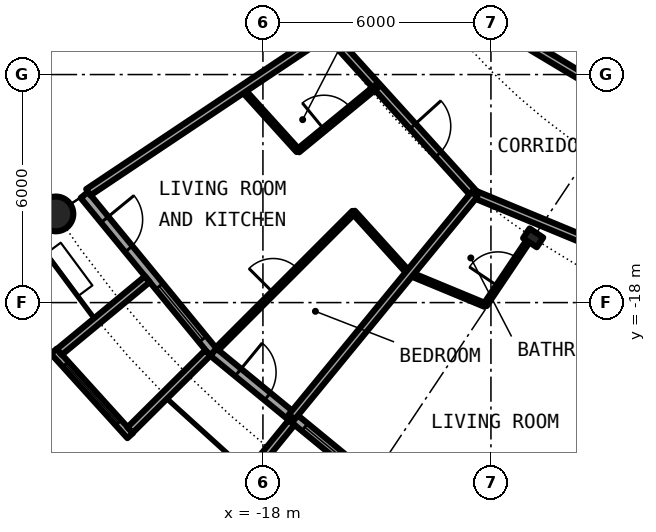
"""IFC4 building model, lengths in metres.
Left out: names, types, materials, properties, quantities, classifications, styles, units other than length and angle.
Written with IfcOpenShell. Run it as: python <this file> out.ifc"""

import sys

from ifc_helpers import new_model, si_unit, direction, frame, frame_2d, origin, origin_2d, place, context, subcontext, project, spatial, rectangle, circle, hollow_circle, i_section, extrude, element, fill, save


model = new_model("IFC4")
c1 = context("Model", 3, precision=1e-05, world=origin(), true_north=direction((0.0, 1.0)))
c2 = subcontext(c1, "Body", "Model", "MODEL_VIEW")
j1 = project(units=[si_unit("LENGTHUNIT", "METRE"), si_unit("PLANEANGLEUNIT", "RADIAN")], contexts=[c1])
p1 = place(None, origin())
s1 = spatial("IfcSite", under=j1, at=p1, CompositionType="ELEMENT")
p2 = place(p1, origin())
s2 = spatial("IfcBuilding", under=s1, at=p2, CompositionType="ELEMENT")
p3 = place(p2, frame((0.0, 0.0, 120.8)))
s3 = spatial("IfcBuildingStorey", under=s2, at=p3, CompositionType="ELEMENT", Elevation=120.8)
p4 = place(p3, frame((-23.448, -15.667, 0.0), z_axis=(0.0, 0.0, 1.0), x_axis=(1.0, 0.0, 0.0)))
e1 = element("IfcColumn", 1, at=p4, inside=s3, PredefinedType="COLUMN", context=c2, shape_type="SweptSolid", body=[
    extrude(hollow_circle(Radius=0.457, WallThickness=0.04, at=origin_2d()), origin(), (0.0, 0.0, 1.0), 3.05),
])
p5 = place(p3, frame((-10.889, -16.297, 0.0), z_axis=(0.0, 0.0, 1.0), x_axis=(-0.55557023302, -0.831469612303, 0.0)))
e2 = element("IfcColumn", 2, at=p5, inside=s3, PredefinedType="COLUMN", context=c2, shape_type="SweptSolid", body=[
    extrude(i_section(OverallWidth=0.307, OverallDepth=0.432, WebThickness=0.021, FlangeThickness=0.04, FilletRadius=0.027, at=origin_2d()), origin(), (0.0, 0.0, 1.0), 3.05),
])
p6 = place(p3, frame((-22.699, -15.167, 0.0), z_axis=(0.0, 0.0, 1.0), x_axis=(0.634382322723, -0.773019449054, 0.0)))
e3 = element("IfcWall", 3, at=p6, inside=s3, PredefinedType="SOLIDWALL", context=c2, shape_type="SweptSolid", body=[
    extrude(rectangle(XDim=5.352, YDim=0.25, at=frame_2d((2.676, 0.0))), origin(), (0.0, 0.0, 1.0), 2.7),
])
p7 = place(p6, frame((0.841, 0.0, 0.0)))
e4 = element("IfcOpeningElement", 4, at=p7, cuts=e3, PredefinedType="OPENING", context=c2, shape_type="SweptSolid", body=[
    extrude(rectangle(XDim=1.0, YDim=2.2, at=frame_2d((0.5, 1.1))), frame((0.0, 0.135, 0.0), z_axis=(0.0, -1.0, 0.0), x_axis=(1.0, 0.0, 0.0)), (0.0, 0.0, 1.0), 0.27),
])
p8 = place(p6, frame((3.111, 0.0, 0.3)))
e5 = element("IfcOpeningElement", 5, at=p8, cuts=e3, PredefinedType="OPENING", context=c2, shape_type="SweptSolid", body=[
    extrude(rectangle(XDim=1.8, YDim=2.1, at=frame_2d((0.9, 1.05))), frame((0.0, 0.135, 0.0), z_axis=(0.0, -1.0, 0.0), x_axis=(1.0, 0.0, 0.0)), (0.0, 0.0, 1.0), 0.27),
])
p9 = place(p3, frame((-23.503, -19.282, -0.03), z_axis=(0.0, 0.0, 1.0), x_axis=(0.671506829416, -0.740998365753, 0.0)))
e6 = element("IfcWall", 6, at=p9, inside=s3, PredefinedType="SOLIDWALL", context=c2, shape_type="SweptSolid", body=[
    extrude(rectangle(XDim=2.993, YDim=0.2, at=frame_2d((1.497, 0.0))), origin(), (0.0, 0.0, 1.0), 2.73),
])
p10 = place(p9, frame((0.457, 0.0, 0.33)))
e7 = element("IfcOpeningElement", 7, at=p10, cuts=e6, PredefinedType="OPENING", context=c2, shape_type="SweptSolid", body=[
    extrude(circle(Radius=1.04, at=frame_2d((1.04, 1.04))), frame((0.0, 0.11, 0.0), z_axis=(0.0, -1.0, 0.0), x_axis=(1.0, 0.0, 0.0)), (0.0, 0.0, 1.0), 0.22),
])
p11 = place(p3, frame((-21.041, -17.384, -0.03), z_axis=(0.0, 0.0, 1.0), x_axis=(-0.770784861449, -0.63709551667, 0.0)))
e8 = element("IfcWall", 8, at=p11, inside=s3, PredefinedType="SOLIDWALL", context=c2, shape_type="SweptSolid", body=[
    extrude(rectangle(XDim=3.006, YDim=0.2, at=frame_2d((1.503, 0.0))), origin(), (0.0, 0.0, 1.0), 2.73),
])
p12 = place(p3, frame((-19.45, -19.323, -0.03), z_axis=(0.0, 0.0, 1.0), x_axis=(-0.709727076896, -0.704476739375, 0.0)))
e9 = element("IfcWall", 9, at=p12, inside=s3, PredefinedType="SOLIDWALL", context=c2, shape_type="SweptSolid", body=[
    extrude(rectangle(XDim=2.883, YDim=0.2, at=frame_2d((1.441, 0.0))), origin(), (0.0, 0.0, 1.0), 2.73),
])
p13 = place(p3, frame((-19.304, -19.304, 0.0), z_axis=(0.0, 0.0, 1.0), x_axis=(0.773019449054, -0.634382322723, 0.0)))
e10 = element("IfcWall", 10, at=p13, inside=s3, PredefinedType="SOLIDWALL", context=c2, shape_type="SweptSolid", body=[
    extrude(rectangle(XDim=5.352, YDim=0.25, at=frame_2d((2.676, 0.0))), origin(), (0.0, 0.0, 1.0), 2.7),
])
p14 = place(p13, frame((0.841, 0.0, 0.0)))
e11 = element("IfcOpeningElement", 11, at=p14, cuts=e10, PredefinedType="OPENING", context=c2, shape_type="SweptSolid", body=[
    extrude(rectangle(XDim=1.0, YDim=2.2, at=frame_2d((0.5, 1.1))), frame((0.0, 0.135, 0.0), z_axis=(0.0, -1.0, 0.0), x_axis=(1.0, 0.0, 0.0)), (0.0, 0.0, 1.0), 0.27),
])
p15 = place(p13, frame((3.111, 0.0, 0.3)))
e12 = element("IfcOpeningElement", 12, at=p15, cuts=e10, PredefinedType="OPENING", context=c2, shape_type="SweptSolid", body=[
    extrude(rectangle(XDim=1.8, YDim=2.1, at=frame_2d((0.9, 1.05))), frame((0.0, 0.135, 0.0), z_axis=(0.0, -1.0, 0.0), x_axis=(1.0, 0.0, 0.0)), (0.0, 0.0, 1.0), 0.27),
])
p16 = place(p3, frame((-17.246, -21.155, -0.03), z_axis=(0.0, 0.0, 1.0), x_axis=(-0.631741648902, -0.775179004516, 0.0)))
e13 = element("IfcWall", 13, at=p16, inside=s3, PredefinedType="SOLIDWALL", context=c2, shape_type="SweptSolid", body=[
    extrude(rectangle(XDim=3.006, YDim=0.2, at=frame_2d((1.503, 0.0))), origin(), (0.0, 0.0, 1.0), 2.73),
])
p17 = place(p3, frame((-18.542, -12.389, 0.0), z_axis=(0.0, 0.0, 1.0), x_axis=(0.671396556615, -0.741098282123, 0.0)))
e14 = element("IfcWall", 14, at=p17, inside=s3, PredefinedType="PARTITIONING", context=c2, shape_type="SweptSolid", body=[
    extrude(rectangle(XDim=2.182, YDim=0.1, at=frame_2d((1.091, 0.0))), origin(), (0.0, 0.0, 1.0), 2.7),
])
p18 = place(p3, frame((-15.617, -15.617, 0.0), z_axis=(0.0, 0.0, 1.0), x_axis=(0.671144831591, -0.741326254107, 0.0)))
e15 = element("IfcWall", 15, at=p18, inside=s3, PredefinedType="PARTITIONING", context=c2, shape_type="SweptSolid", body=[
    extrude(rectangle(XDim=2.181, YDim=0.1, at=frame_2d((1.091, 0.0))), origin(), (0.0, 0.0, 1.0), 2.7),
])
p19 = place(p3, frame((-14.147, -17.238, 0.0), z_axis=(0.0, 0.0, 1.0), x_axis=(0.923874819588, -0.382694810171, 0.0)))
e16 = element("IfcWall", 16, at=p19, inside=s3, PredefinedType="PARTITIONING", context=c2, shape_type="SweptSolid", body=[
    extrude(rectangle(XDim=2.158, YDim=0.1, at=frame_2d((1.079, 0.0))), origin(), (0.0, 0.0, 1.0), 2.7),
])
p20 = place(p3, frame((-16.192, -11.004, 0.0), z_axis=(0.0, 0.0, 1.0), x_axis=(0.671481997275, -0.741020868354, 0.0)))
e17 = element("IfcWall", 17, at=p20, inside=s3, PredefinedType="PARTITIONING", context=c2, shape_type="SweptSolid", body=[
    extrude(rectangle(XDim=5.596, YDim=0.2, at=frame_2d((2.798, 0.0))), origin(), (0.0, 0.0, 1.0), 2.39),
])
p21 = place(p20, frame((3.179, 0.0, 0.0)))
e18 = element("IfcOpeningElement", 18, at=p21, cuts=e17, PredefinedType="OPENING", context=c2, shape_type="SweptSolid", body=[
    extrude(rectangle(XDim=1.0, YDim=2.3, at=frame_2d((0.5, 1.15))), frame((0.0, 0.11, 0.0), z_axis=(0.0, -1.0, 0.0), x_axis=(1.0, 0.0, 0.0)), (0.0, 0.0, 1.0), 0.22),
])
p22 = place(p3, frame((-12.434, -15.151, 0.0), z_axis=(0.0, 0.0, 1.0), x_axis=(0.923888467236, -0.382661861319, 0.0)))
e19 = element("IfcWall", 19, at=p22, inside=s3, PredefinedType="PARTITIONING", context=c2, shape_type="SweptSolid", body=[
    extrude(rectangle(XDim=11.381, YDim=0.2, at=frame_2d((5.691, 0.0))), origin(), (0.0, 0.0, 1.0), 2.7),
])
p23 = place(p22, frame((3.292, 0.0, 0.0)))
e20 = element("IfcOpeningElement", 20, at=p23, cuts=e19, PredefinedType="OPENING", context=c2, shape_type="SweptSolid", body=[
    extrude(rectangle(XDim=1.0, YDim=2.3, at=frame_2d((0.5, 1.15))), frame((0.0, 0.11, 0.0), z_axis=(0.0, -1.0, 0.0), x_axis=(1.0, 0.0, 0.0)), (0.0, 0.0, 1.0), 0.22),
])
p24 = place(p3, frame((-14.051, -9.391, 0.0), z_axis=(0.0, 0.0, 1.0), x_axis=(0.857768591583, -0.514036033069, 0.0)))
e21 = element("IfcWall", 21, at=p24, inside=s3, PredefinedType="PARTITIONING", context=c2, shape_type="SweptSolid", body=[
    extrude(rectangle(XDim=14.45, YDim=0.2, at=frame_2d((7.225, 0.0))), origin(), (0.0, 0.0, 1.0), 2.7),
])
p25 = place(p24, frame((9.133, 0.0, 0.0)))
e22 = element("IfcOpeningElement", 22, at=p25, cuts=e21, PredefinedType="OPENING", context=c2, shape_type="SweptSolid", body=[
    extrude(rectangle(XDim=1.0, YDim=2.3, at=frame_2d((0.5, 1.15))), frame((0.0, 0.11, 0.0), z_axis=(0.0, -1.0, 0.0), x_axis=(1.0, 0.0, 0.0)), (0.0, 0.0, 1.0), 0.22),
])
p26 = place(p3, frame((-22.595, -15.097, 0.0), z_axis=(0.0, 0.0, 1.0), x_axis=(0.831467903109, 0.555572791, 0.0)))
e23 = element("IfcWall", 23, at=p26, inside=s3, PredefinedType="PARTITIONING", context=c2, shape_type="SweptSolid", body=[
    extrude(rectangle(XDim=7.358, YDim=0.2, at=frame_2d((3.679, 0.0))), origin(), (0.0, 0.0, 1.0), 2.7),
])
p27 = place(p3, frame((-19.21, -19.222, 0.0), z_axis=(0.0, 0.0, 1.0), x_axis=(0.706914880313, 0.707298629994, 0.0)))
e24 = element("IfcWall", 24, at=p27, inside=s3, PredefinedType="PARTITIONING", context=c2, shape_type="SweptSolid", body=[
    extrude(rectangle(XDim=5.09, YDim=0.1, at=frame_2d((2.545, 0.0))), origin(), (0.0, 0.0, 1.0), 2.7),
])
p28 = place(p27, frame((2.095, 0.0, 0.0)))
e25 = element("IfcOpeningElement", 25, at=p28, cuts=e24, PredefinedType="OPENING", context=c2, shape_type="SweptSolid", body=[
    extrude(rectangle(XDim=0.9, YDim=2.3, at=frame_2d((0.45, 1.15))), frame((0.0, 0.06, 0.0), z_axis=(0.0, -1.0, 0.0), x_axis=(1.0, 0.0, 0.0)), (0.0, 0.0, 1.0), 0.12),
])
p29 = place(p3, frame((-17.24, -21.007, 0.0), z_axis=(0.0, 0.0, 1.0), x_axis=(0.634381303318, 0.773020285633, 0.0)))
e26 = element("IfcWall", 26, at=p29, inside=s3, PredefinedType="PARTITIONING", context=c2, shape_type="SweptSolid", body=[
    extrude(rectangle(XDim=7.576, YDim=0.2, at=frame_2d((3.788, 0.0))), origin(), (0.0, 0.0, 1.0), 2.7),
])
p30 = place(p3, frame((-17.077, -14.006, 0.0), z_axis=(0.0, 0.0, 1.0), x_axis=(0.77319617123, 0.634166918717, 0.0)))
e27 = element("IfcWall", 27, at=p30, inside=s3, PredefinedType="PARTITIONING", context=c2, shape_type="SweptSolid", body=[
    extrude(rectangle(XDim=2.675, YDim=0.1, at=frame_2d((1.337, 0.0))), origin(), (0.0, 0.0, 1.0), 2.7),
])
p31 = place(p30, frame((0.887, 0.0, 0.0)))
e28 = element("IfcOpeningElement", 28, at=p31, cuts=e27, PredefinedType="OPENING", context=c2, shape_type="SweptSolid", body=[
    extrude(rectangle(XDim=0.9, YDim=2.3, at=frame_2d((0.45, 1.15))), frame((0.0, 0.06, 0.0), z_axis=(0.0, -1.0, 0.0), x_axis=(1.0, 0.0, 0.0)), (0.0, 0.0, 1.0), 0.12),
])
p32 = place(p3, frame((-12.153, -18.064, 0.0), z_axis=(0.0, 0.0, 1.0), x_axis=(0.557893831879, 0.829912328112, 0.0)))
e29 = element("IfcWall", 29, at=p32, inside=s3, PredefinedType="PARTITIONING", context=c2, shape_type="SweptSolid", body=[
    extrude(rectangle(XDim=1.956, YDim=0.1, at=frame_2d((0.978, 0.0))), origin(), (0.0, 0.0, 1.0), 2.7),
])
p33 = place(p32, frame((0.6, 0.0, 0.0)))
e30 = element("IfcOpeningElement", 30, at=p33, cuts=e29, PredefinedType="OPENING", context=c2, shape_type="SweptSolid", body=[
    extrude(rectangle(XDim=0.9, YDim=2.3, at=frame_2d((0.45, 1.15))), frame((0.0, 0.06, 0.0), z_axis=(0.0, -1.0, 0.0), x_axis=(1.0, 0.0, 0.0)), (0.0, 0.0, 1.0), 0.12),
])
p34 = place(p3, frame((-10.399, -25.106, 0.0), z_axis=(0.0, 0.0, 1.0), x_axis=(0.382697543868, 0.923873687209, 0.0)))
e31 = element("IfcWall", 31, at=p34, inside=s3, PredefinedType="PARTITIONING", context=c2, shape_type="SweptSolid", body=[
    extrude(rectangle(XDim=8.419, YDim=0.1, at=frame_2d((4.209, 0.0))), origin(), (0.0, 0.0, 1.0), 2.7),
])
p35 = place(p34, frame((6.677, 0.0, 0.0)))
e32 = element("IfcOpeningElement", 32, at=p35, cuts=e31, PredefinedType="OPENING", context=c2, shape_type="SweptSolid", body=[
    extrude(rectangle(XDim=0.9, YDim=2.3, at=frame_2d((0.45, 1.15))), frame((0.0, 0.06, 0.0), z_axis=(0.0, -1.0, 0.0), x_axis=(1.0, 0.0, 0.0)), (0.0, 0.0, 1.0), 0.12),
])
p36 = place(p34, frame((2.468, 0.0, 0.0)))
e33 = element("IfcOpeningElement", 33, at=p36, cuts=e31, PredefinedType="OPENING", context=c2, shape_type="SweptSolid", body=[
    extrude(rectangle(XDim=0.9, YDim=2.3, at=frame_2d((0.45, 1.15))), frame((0.0, 0.06, 0.0), z_axis=(0.0, -1.0, 0.0), x_axis=(1.0, 0.0, 0.0)), (0.0, 0.0, 1.0), 0.12),
])
p37 = place(p7, origin())
e34 = element("IfcDoor", 34, at=p37, inside=s3, OperationType="SINGLE_SWING_LEFT", PredefinedType="DOOR", context=c2, shape_type="SweptSolid", body=[
    extrude(rectangle(XDim=1.0, YDim=2.2, at=frame_2d((0.5, 1.1))), frame((0.0, 0.025, 0.0), z_axis=(0.0, -1.0, 0.0), x_axis=(1.0, 0.0, 0.0)), (0.0, 0.0, 1.0), 0.05),
])
fill(e4, e34)
p38 = place(p8, origin())
e35 = element("IfcWindow", 35, at=p38, inside=s3, PartitioningType="SINGLE_PANEL", PredefinedType="WINDOW", context=c2, shape_type="SweptSolid", body=[
    extrude(rectangle(XDim=1.8, YDim=2.1, at=frame_2d((0.9, 1.05))), frame((0.0, 0.03, 0.0), z_axis=(0.0, -1.0, 0.0), x_axis=(1.0, 0.0, 0.0)), (0.0, 0.0, 1.0), 0.06),
])
fill(e5, e35)
p39 = place(p10, origin())
e36 = element("IfcWindow", 36, at=p39, inside=s3, PartitioningType="SINGLE_PANEL", PredefinedType="WINDOW", context=c2, shape_type="SweptSolid", body=[
    extrude(circle(Radius=1.04, at=frame_2d((1.04, 1.04))), frame((0.0, 0.03, 0.0), z_axis=(0.0, -1.0, 0.0), x_axis=(1.0, 0.0, 0.0)), (0.0, 0.0, 1.0), 0.06),
])
fill(e7, e36)
p40 = place(p14, origin())
e37 = element("IfcDoor", 37, at=p40, inside=s3, OperationType="SINGLE_SWING_LEFT", PredefinedType="DOOR", context=c2, shape_type="SweptSolid", body=[
    extrude(rectangle(XDim=1.0, YDim=2.2, at=frame_2d((0.5, 1.1))), frame((0.0, 0.025, 0.0), z_axis=(0.0, -1.0, 0.0), x_axis=(1.0, 0.0, 0.0)), (0.0, 0.0, 1.0), 0.05),
])
fill(e11, e37)
p41 = place(p15, origin())
e38 = element("IfcWindow", 38, at=p41, inside=s3, PartitioningType="SINGLE_PANEL", PredefinedType="WINDOW", context=c2, shape_type="SweptSolid", body=[
    extrude(rectangle(XDim=1.8, YDim=2.1, at=frame_2d((0.9, 1.05))), frame((0.0, 0.03, 0.0), z_axis=(0.0, -1.0, 0.0), x_axis=(1.0, 0.0, 0.0)), (0.0, 0.0, 1.0), 0.06),
])
fill(e12, e38)
p42 = place(p21, origin())
e39 = element("IfcDoor", 39, at=p42, inside=s3, OperationType="SINGLE_SWING_RIGHT", PredefinedType="DOOR", context=c2, shape_type="SweptSolid", body=[
    extrude(rectangle(XDim=1.0, YDim=2.3, at=frame_2d((0.5, 1.15))), frame((0.0, 0.025, 0.0), z_axis=(0.0, -1.0, 0.0), x_axis=(1.0, 0.0, 0.0)), (0.0, 0.0, 1.0), 0.05),
])
fill(e18, e39)
p43 = place(p31, origin())
e40 = element("IfcDoor", 40, at=p43, inside=s3, OperationType="SINGLE_SWING_LEFT", PredefinedType="DOOR", context=c2, shape_type="SweptSolid", body=[
    extrude(rectangle(XDim=0.9, YDim=2.3, at=frame_2d((0.45, 1.15))), frame((0.0, 0.025, 0.0), z_axis=(0.0, -1.0, 0.0), x_axis=(1.0, 0.0, 0.0)), (0.0, 0.0, 1.0), 0.05),
])
fill(e28, e40)
p44 = place(p28, origin())
e41 = element("IfcDoor", 41, at=p44, inside=s3, OperationType="SINGLE_SWING_RIGHT", PredefinedType="DOOR", context=c2, shape_type="SweptSolid", body=[
    extrude(rectangle(XDim=0.9, YDim=2.3, at=frame_2d((0.45, 1.15))), frame((0.0, 0.025, 0.0), z_axis=(0.0, -1.0, 0.0), x_axis=(1.0, 0.0, 0.0)), (0.0, 0.0, 1.0), 0.05),
])
fill(e25, e41)
p45 = place(p33, origin())
e42 = element("IfcDoor", 42, at=p45, inside=s3, OperationType="SINGLE_SWING_RIGHT", PredefinedType="DOOR", context=c2, shape_type="SweptSolid", body=[
    extrude(rectangle(XDim=0.9, YDim=2.3, at=frame_2d((0.45, 1.15))), frame((0.0, 0.025, 0.0), z_axis=(0.0, -1.0, 0.0), x_axis=(1.0, 0.0, 0.0)), (0.0, 0.0, 1.0), 0.05),
])
fill(e30, e42)
save(model, sys.argv[1])
